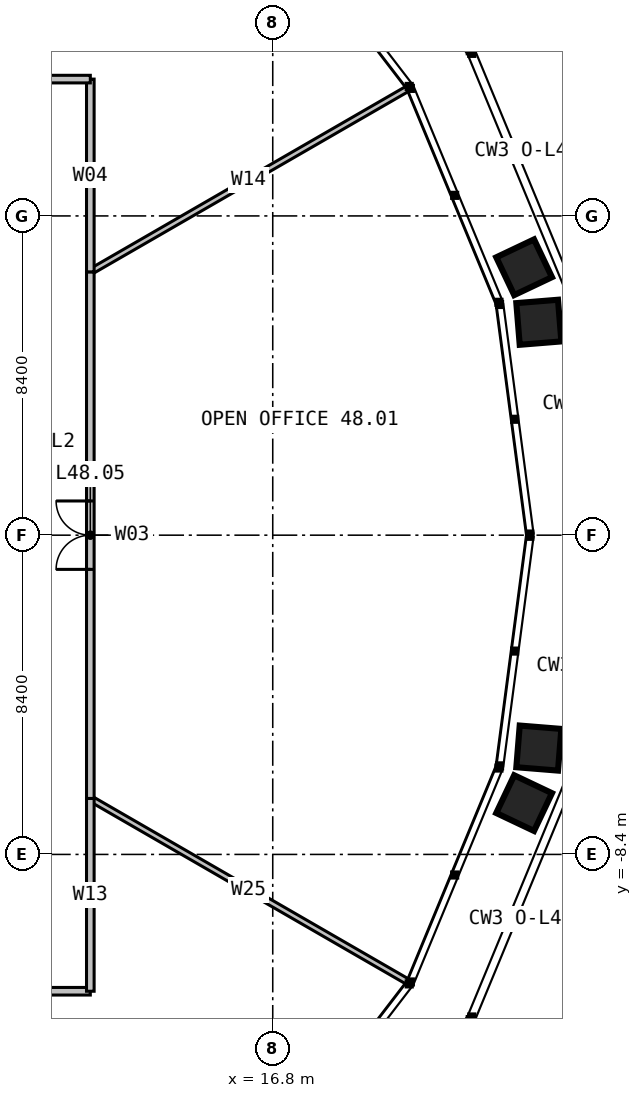
"""IFC4 building model, lengths in metres.
Left out: names, types, materials, properties, quantities, classifications, styles, units other than length and angle.
Written with IfcOpenShell. Run it as: python <this file> out.ifc"""

import sys

from ifc_helpers import new_model, si_unit, direction, frame, frame_2d, origin, place, context, subcontext, project, spatial, rectangle, extrude, element, fill, save


model = new_model("IFC4")
c1 = context("Model", 3, precision=1e-05, world=origin(), true_north=direction((0.0, 1.0)))
c2 = subcontext(c1, "Body", "Model", "MODEL_VIEW")
j1 = project(units=[si_unit("LENGTHUNIT", "METRE"), si_unit("PLANEANGLEUNIT", "RADIAN")], contexts=[c1])
p1 = place(None, origin())
s1 = spatial("IfcSite", under=j1, at=p1, CompositionType="ELEMENT")
p2 = place(p1, origin())
s2 = spatial("IfcBuilding", under=s1, at=p2, CompositionType="ELEMENT")
p3 = place(p2, frame((0.0, 0.0, 199.0)))
s3 = spatial("IfcBuildingStorey", under=s2, at=p3, CompositionType="ELEMENT", Elevation=199.0)
for number, where, z_axis, x_axis in (
    (1, (12.0, -6.928, 0.0), (0.0, 0.0, 1.0), (0.866, -0.5, 0.0)),
    (2, (12.0, 6.928, 0.0), (0.0, 0.0, 1.0), (0.866, 0.5, 0.0)),
    (3, (6.928, 12.0, 0.0), (0.0, 0.0, 1.0), (0.5, 0.866, 0.0)),
    (4, (6.928, -12.0, 0.0), (0.0, 0.0, 1.0), (0.5, -0.866, 0.0)),
):
    element("IfcWall", number, at=place(p3, frame(where, z_axis=z_axis, x_axis=x_axis)), inside=s3, PredefinedType="PARTITIONING", context=c2, shape_type="SweptSolid", body=[
        extrude(rectangle(XDim=9.62, YDim=0.15, at=frame_2d((4.81, 0.0))), origin(), (0.0, 0.0, 1.0), 2.79),
    ])
p4 = place(p3, frame((12.0, -6.928, 0.0), z_axis=(0.0, 0.0, 1.0), x_axis=(0.0, 1.0, 0.0)))
e5 = element("IfcWall", 5, at=p4, inside=s3, PredefinedType="PARTITIONING", context=c2, shape_type="SweptSolid", body=[
    extrude(rectangle(XDim=13.856, YDim=0.2, at=frame_2d((6.928, 0.0))), origin(), (0.0, 0.0, 1.0), 3.8),
])
p5 = place(p4, frame((6.028, 0.0, 0.0)))
e6 = element("IfcOpeningElement", 6, at=p5, cuts=e5, PredefinedType="OPENING", context=c2, shape_type="SweptSolid", body=[
    extrude(rectangle(XDim=1.8, YDim=2.2, at=frame_2d((0.9, 1.1))), frame((0.0, 0.11, 0.0), z_axis=(0.0, -1.0, 0.0), x_axis=(1.0, 0.0, 0.0)), (0.0, 0.0, 1.0), 0.22),
])
p6 = place(p3, frame((12.0, 6.928, 0.0), z_axis=(0.0, 0.0, 1.0), x_axis=(0.0, 1.0, 0.0)))
e7 = element("IfcWall", 7, at=p6, inside=s3, PredefinedType="PARTITIONING", context=c2, shape_type="SweptSolid", body=[
    extrude(rectangle(XDim=5.072, YDim=0.2, at=frame_2d((2.536, 0.0))), origin(), (0.0, 0.0, 1.0), 3.8),
])
p7 = place(p3, frame((12.0, 12.0, 0.0), z_axis=(0.0, 0.0, 1.0), x_axis=(-1.0, 0.0, 0.0)))
e8 = element("IfcWall", 8, at=p7, inside=s3, PredefinedType="PARTITIONING", context=c2, shape_type="SweptSolid", body=[
    extrude(rectangle(XDim=5.072, YDim=0.2, at=frame_2d((2.536, 0.0))), origin(), (0.0, 0.0, 1.0), 3.8),
])
p8 = place(p7, frame((1.636, 0.0, 0.0)))
e9 = element("IfcOpeningElement", 9, at=p8, cuts=e8, PredefinedType="OPENING", context=c2, shape_type="SweptSolid", body=[
    extrude(rectangle(XDim=1.8, YDim=2.2, at=frame_2d((0.9, 1.1))), frame((0.0, 0.11, 0.0), z_axis=(0.0, -1.0, 0.0), x_axis=(1.0, 0.0, 0.0)), (0.0, 0.0, 1.0), 0.22),
])
p9 = place(p3, frame((6.928, -12.0, 0.0), z_axis=(0.0, 0.0, 1.0), x_axis=(1.0, 0.0, 0.0)))
e10 = element("IfcWall", 10, at=p9, inside=s3, PredefinedType="PARTITIONING", context=c2, shape_type="SweptSolid", body=[
    extrude(rectangle(XDim=5.072, YDim=0.2, at=frame_2d((2.536, 0.0))), origin(), (0.0, 0.0, 1.0), 3.8),
])
p10 = place(p9, frame((1.636, 0.0, 0.0)))
e11 = element("IfcOpeningElement", 11, at=p10, cuts=e10, PredefinedType="OPENING", context=c2, shape_type="SweptSolid", body=[
    extrude(rectangle(XDim=1.8, YDim=2.2, at=frame_2d((0.9, 1.1))), frame((0.0, 0.11, 0.0), z_axis=(0.0, -1.0, 0.0), x_axis=(1.0, 0.0, 0.0)), (0.0, 0.0, 1.0), 0.22),
])
p11 = place(p3, frame((12.0, -12.0, 0.0), z_axis=(0.0, 0.0, 1.0), x_axis=(0.0, 1.0, 0.0)))
e12 = element("IfcWall", 12, at=p11, inside=s3, PredefinedType="PARTITIONING", context=c2, shape_type="SweptSolid", body=[
    extrude(rectangle(XDim=5.072, YDim=0.2, at=frame_2d((2.536, 0.0))), origin(), (0.0, 0.0, 1.0), 3.8),
])
p12 = place(p5, origin())
e13 = element("IfcDoor", 13, at=p12, inside=s3, OperationType="DOUBLE_DOOR_SINGLE_SWING", PredefinedType="DOOR", context=c2, shape_type="SweptSolid", body=[
    extrude(rectangle(XDim=1.8, YDim=2.2, at=frame_2d((0.9, 1.1))), frame((0.0, 0.025, 0.0), z_axis=(0.0, -1.0, 0.0), x_axis=(1.0, 0.0, 0.0)), (0.0, 0.0, 1.0), 0.05),
])
fill(e6, e13)
save(model, sys.argv[1])
